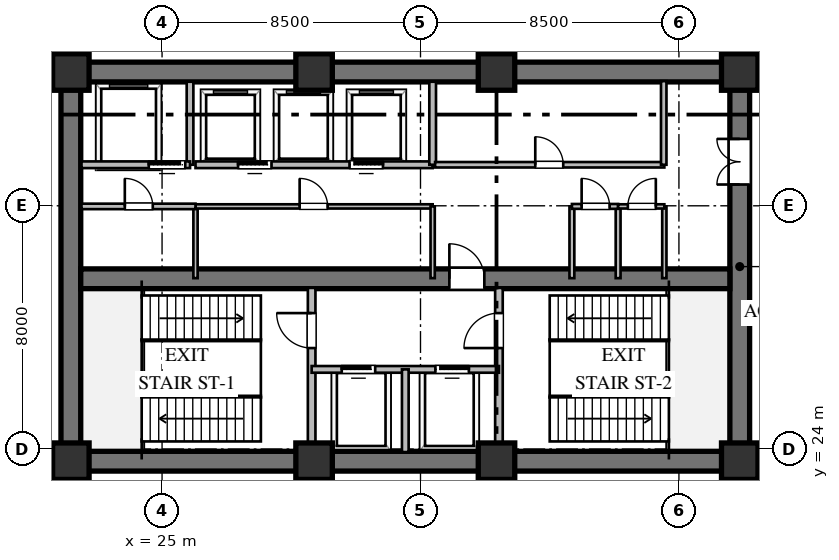
"""IFC4 building model, lengths in metres.
Left out: names, types, materials, properties, quantities, classifications, styles, units other than length and angle.
Written with IfcOpenShell. Run it as: python <this file> out.ifc"""

import sys

from ifc_helpers import new_model, si_unit, direction, frame, frame_2d, origin, origin_2d, place, context, subcontext, project, spatial, rectangle, extrude, element, fill, save


model = new_model("IFC4")
c1 = context("Model", 3, precision=1e-05, world=origin(), true_north=direction((0.0, 1.0)))
c2 = subcontext(c1, "Body", "Model", "MODEL_VIEW")
j1 = project(units=[si_unit("LENGTHUNIT", "METRE"), si_unit("PLANEANGLEUNIT", "RADIAN")], contexts=[c1])
p1 = place(None, origin())
s1 = spatial("IfcSite", under=j1, at=p1, CompositionType="ELEMENT")
p2 = place(p1, origin())
s2 = spatial("IfcBuilding", under=s1, at=p2, CompositionType="ELEMENT")
p3 = place(p2, frame((0.0, 0.0, -5.4)))
s3 = spatial("IfcBuildingStorey", under=s2, at=p3, CompositionType="ELEMENT", Elevation=-5.4)
for number, where, z_axis, x_axis in (
    (1, (21.675, 23.6, 0.0), (0.0, 0.0, 1.0), (1.0, 0.0, 0.0)),
    (2, (21.675, 36.4, 0.0), (0.0, 0.0, 1.0), (1.0, 0.0, 0.0)),
):
    element("IfcWall", number, at=place(p3, frame(where, z_axis=z_axis, x_axis=x_axis)), inside=s3, PredefinedType="SHEAR", context=c2, shape_type="SweptSolid", body=[
        extrude(rectangle(XDim=22.65, YDim=0.65, at=frame_2d((11.325, 0.0))), origin(), (0.0, 0.0, 1.0), 5.12),
    ])
p4 = place(p3, frame((22.0, 23.925, 0.0), z_axis=(0.0, 0.0, 1.0), x_axis=(0.0, 1.0, 0.0)))
e3 = element("IfcWall", 3, at=p4, inside=s3, PredefinedType="SHEAR", context=c2, shape_type="SweptSolid", body=[
    extrude(rectangle(XDim=12.15, YDim=0.65, at=frame_2d((6.075, 0.0))), origin(), (0.0, 0.0, 1.0), 5.12),
])
p5 = place(p3, frame((44.0, 23.925, 0.0), z_axis=(0.0, 0.0, 1.0), x_axis=(0.0, 1.0, 0.0)))
e4 = element("IfcWall", 4, at=p5, inside=s3, PredefinedType="SHEAR", context=c2, shape_type="SweptSolid", body=[
    extrude(rectangle(XDim=12.15, YDim=0.65, at=frame_2d((6.075, 0.0))), origin(), (0.0, 0.0, 1.0), 5.12),
])
p6 = place(p5, frame((8.775, 0.0, 0.0)))
e5 = element("IfcOpeningElement", 5, at=p6, cuts=e4, PredefinedType="OPENING", context=c2, shape_type="SweptSolid", body=[
    extrude(rectangle(XDim=1.5, YDim=2.15, at=frame_2d((0.75, 1.075))), frame((0.0, 0.335, 0.0), z_axis=(0.0, -1.0, 0.0), x_axis=(1.0, 0.0, 0.0)), (0.0, 0.0, 1.0), 0.67),
])
p7 = place(p3, frame((22.325, 29.6, 0.0), z_axis=(0.0, 0.0, 1.0), x_axis=(1.0, 0.0, 0.0)))
e6 = element("IfcWall", 6, at=p7, inside=s3, PredefinedType="SHEAR", context=c2, shape_type="SweptSolid", body=[
    extrude(rectangle(XDim=21.35, YDim=0.65, at=frame_2d((10.675, 0.0))), origin(), (0.0, 0.0, 1.0), 5.12),
])
p8 = place(p7, frame((12.125, 0.0, 0.0)))
e7 = element("IfcOpeningElement", 7, at=p8, cuts=e6, PredefinedType="OPENING", context=c2, shape_type="SweptSolid", body=[
    extrude(rectangle(XDim=1.15, YDim=2.1, at=frame_2d((0.575, 1.05))), frame((0.0, 0.335, 0.0), z_axis=(0.0, -1.0, 0.0), x_axis=(1.0, 0.0, 0.0)), (0.0, 0.0, 1.0), 0.67),
])
for number, where, z_axis, x_axis in (
    (8, (22.0, 23.6, 0.0), (0.0, 0.0, 1.0), (1.0, 0.0, 0.0)),
    (9, (30.0, 23.6, 0.0), (0.0, 0.0, 1.0), (1.0, 0.0, 0.0)),
    (10, (36.0, 23.6, 0.0), (0.0, 0.0, 1.0), (1.0, 0.0, 0.0)),
    (11, (44.0, 23.6, 0.0), (0.0, 0.0, 1.0), (1.0, 0.0, 0.0)),
    (12, (44.0, 36.4, 0.0), (0.0, 0.0, 1.0), (1.0, 0.0, 0.0)),
    (13, (36.0, 36.4, 0.0), (0.0, 0.0, 1.0), (1.0, 0.0, 0.0)),
    (14, (30.0, 36.4, 0.0), (0.0, 0.0, 1.0), (1.0, 0.0, 0.0)),
    (15, (22.0, 36.4, 0.0), (0.0, 0.0, 1.0), (1.0, 0.0, 0.0)),
):
    element("IfcColumn", number, at=place(p3, frame(where, z_axis=z_axis, x_axis=x_axis)), inside=s3, PredefinedType="COLUMN", context=c2, shape_type="SweptSolid", body=[
        extrude(rectangle(XDim=1.2, YDim=1.2, at=origin_2d()), origin(), (0.0, 0.0, 1.0), 5.4),
    ])
p9 = place(p3, frame((29.92, 23.9, 0.0), z_axis=(0.0, 0.0, 1.0), x_axis=(0.0, 1.0, 0.0)))
e16 = element("IfcWall", 16, at=p9, inside=s3, PredefinedType="SOLIDWALL", context=c2, shape_type="SweptSolid", body=[
    extrude(rectangle(XDim=5.4, YDim=0.25, at=frame_2d((2.7, 0.0))), origin(), (0.0, 0.0, 1.0), 5.12),
])
p10 = place(p9, frame((3.421, 0.0, 0.0)))
e17 = element("IfcOpeningElement", 17, at=p10, cuts=e16, PredefinedType="OPENING", context=c2, shape_type="SweptSolid", body=[
    extrude(rectangle(XDim=1.15, YDim=2.1, at=frame_2d((0.575, 1.05))), frame((0.0, 0.135, 0.0), z_axis=(0.0, -1.0, 0.0), x_axis=(1.0, 0.0, 0.0)), (0.0, 0.0, 1.0), 0.27),
])
p11 = place(p3, frame((36.08, 23.9, 0.0), z_axis=(0.0, 0.0, 1.0), x_axis=(0.0, 1.0, 0.0)))
e18 = element("IfcWall", 18, at=p11, inside=s3, PredefinedType="SOLIDWALL", context=c2, shape_type="SweptSolid", body=[
    extrude(rectangle(XDim=5.4, YDim=0.25, at=frame_2d((2.7, 0.0))), origin(), (0.0, 0.0, 1.0), 5.12),
])
p12 = place(p11, frame((3.421, 0.0, 0.0)))
e19 = element("IfcOpeningElement", 19, at=p12, cuts=e18, PredefinedType="OPENING", context=c2, shape_type="SweptSolid", body=[
    extrude(rectangle(XDim=1.15, YDim=2.1, at=frame_2d((0.575, 1.05))), frame((0.0, 0.135, 0.0), z_axis=(0.0, -1.0, 0.0), x_axis=(1.0, 0.0, 0.0)), (0.0, 0.0, 1.0), 0.27),
])
p13 = place(p3, frame((29.92, 26.62, 0.0), z_axis=(0.0, 0.0, 1.0), x_axis=(1.0, 0.0, 0.0)))
e20 = element("IfcWall", 20, at=p13, inside=s3, PredefinedType="SOLIDWALL", context=c2, shape_type="SweptSolid", body=[
    extrude(rectangle(XDim=6.16, YDim=0.22, at=frame_2d((3.08, 0.0))), origin(), (0.0, 0.0, 1.0), 5.12),
])
p14 = place(p13, frame((0.99, 0.0, 0.0)))
e21 = element("IfcOpeningElement", 21, at=p14, cuts=e20, PredefinedType="OPENING", context=c2, shape_type="SweptSolid", body=[
    extrude(rectangle(XDim=1.1, YDim=2.1, at=frame_2d((0.55, 1.05))), frame((0.0, 0.12, 0.0), z_axis=(0.0, -1.0, 0.0), x_axis=(1.0, 0.0, 0.0)), (0.0, 0.0, 1.0), 0.24),
])
p15 = place(p13, frame((4.07, 0.0, 0.0)))
e22 = element("IfcOpeningElement", 22, at=p15, cuts=e20, PredefinedType="OPENING", context=c2, shape_type="SweptSolid", body=[
    extrude(rectangle(XDim=1.1, YDim=2.1, at=frame_2d((0.55, 1.05))), frame((0.0, 0.12, 0.0), z_axis=(0.0, -1.0, 0.0), x_axis=(1.0, 0.0, 0.0)), (0.0, 0.0, 1.0), 0.24),
])
p16 = place(p3, frame((33.0, 23.9, 0.0), z_axis=(0.0, 0.0, 1.0), x_axis=(0.0, 1.0, 0.0)))
e23 = element("IfcWall", 23, at=p16, inside=s3, PredefinedType="SOLIDWALL", context=c2, shape_type="SweptSolid", body=[
    extrude(rectangle(XDim=2.72, YDim=0.22, at=frame_2d((1.36, 0.0))), origin(), (0.0, 0.0, 1.0), 5.12),
])
p17 = place(p3, frame((25.92, 33.35, 0.0), z_axis=(0.0, 0.0, 1.0), x_axis=(0.0, 1.0, 0.0)))
e24 = element("IfcWall", 24, at=p17, inside=s3, PredefinedType="SOLIDWALL", context=c2, shape_type="SweptSolid", body=[
    extrude(rectangle(XDim=2.73, YDim=0.22, at=frame_2d((1.365, 0.0))), origin(), (0.0, 0.0, 1.0), 5.12),
])
p18 = place(p3, frame((22.35, 33.35, 0.0), z_axis=(0.0, 0.0, 1.0), x_axis=(1.0, 0.0, 0.0)))
e25 = element("IfcWall", 25, at=p18, inside=s3, PredefinedType="SOLIDWALL", context=c2, shape_type="SweptSolid", body=[
    extrude(rectangle(XDim=3.57, YDim=0.22, at=frame_2d((1.785, 0.0))), origin(), (0.0, 0.0, 1.0), 5.12),
])
p19 = place(p18, frame((2.213, 0.0, 0.0)))
e26 = element("IfcOpeningElement", 26, at=p19, cuts=e25, PredefinedType="OPENING", context=c2, shape_type="SweptSolid", body=[
    extrude(rectangle(XDim=1.2, YDim=2.1, at=frame_2d((0.6, 1.05))), frame((0.0, 0.12, 0.0), z_axis=(0.0, -1.0, 0.0), x_axis=(1.0, 0.0, 0.0)), (0.0, 0.0, 1.0), 0.24),
])
p20 = place(p3, frame((26.1, 29.62, 0.0), z_axis=(0.0, 0.0, 1.0), x_axis=(0.0, 1.0, 0.0)))
e27 = element("IfcWall", 27, at=p20, inside=s3, PredefinedType="PARTITIONING", context=c2, shape_type="SweptSolid", body=[
    extrude(rectangle(XDim=2.36, YDim=0.14, at=frame_2d((1.18, 0.0))), origin(), (0.0, 0.0, 1.0), 5.12),
])
p21 = place(p3, frame((26.1, 31.98, 0.0), z_axis=(0.0, 0.0, 1.0), x_axis=(1.0, 0.0, 0.0)))
e28 = element("IfcWall", 28, at=p21, inside=s3, PredefinedType="PARTITIONING", context=c2, shape_type="SweptSolid", body=[
    extrude(rectangle(XDim=7.8, YDim=0.14, at=frame_2d((3.9, 0.0))), origin(), (0.0, 0.0, 1.0), 5.12),
])
p22 = place(p21, frame((3.425, 0.0, 0.0)))
e29 = element("IfcOpeningElement", 29, at=p22, cuts=e28, PredefinedType="OPENING", context=c2, shape_type="SweptSolid", body=[
    extrude(rectangle(XDim=0.92, YDim=2.1, at=frame_2d((0.46, 1.05))), frame((0.0, 0.08, 0.0), z_axis=(0.0, -1.0, 0.0), x_axis=(1.0, 0.0, 0.0)), (0.0, 0.0, 1.0), 0.16),
])
p23 = place(p3, frame((33.9, 29.62, 0.0), z_axis=(0.0, 0.0, 1.0), x_axis=(0.0, 1.0, 0.0)))
e30 = element("IfcWall", 30, at=p23, inside=s3, PredefinedType="PARTITIONING", context=c2, shape_type="SweptSolid", body=[
    extrude(rectangle(XDim=2.36, YDim=0.14, at=frame_2d((1.18, 0.0))), origin(), (0.0, 0.0, 1.0), 5.12),
])
p24 = place(p3, frame((26.1, 33.35, 0.0), z_axis=(0.0, 0.0, 1.0), x_axis=(1.0, 0.0, 0.0)))
e31 = element("IfcWall", 31, at=p24, inside=s3, PredefinedType="SOLIDWALL", context=c2, shape_type="SweptSolid", body=[
    extrude(rectangle(XDim=7.8, YDim=0.22, at=frame_2d((3.9, 0.0))), origin(), (0.0, 0.0, 1.0), 5.12),
])
p25 = place(p24, frame((1.4, 0.0, 0.0)))
e32 = element("IfcOpeningElement", 32, at=p25, cuts=e31, PredefinedType="OPENING", context=c2, shape_type="SweptSolid", body=[
    extrude(rectangle(XDim=1.1, YDim=2.1, at=frame_2d((0.55, 1.05))), frame((0.0, 0.12, 0.0), z_axis=(0.0, -1.0, 0.0), x_axis=(1.0, 0.0, 0.0)), (0.0, 0.0, 1.0), 0.24),
])
p26 = place(p24, frame((5.066, 0.0, 0.0)))
e33 = element("IfcOpeningElement", 33, at=p26, cuts=e31, PredefinedType="OPENING", context=c2, shape_type="SweptSolid", body=[
    extrude(rectangle(XDim=1.1, YDim=2.1, at=frame_2d((0.55, 1.05))), frame((0.0, 0.12, 0.0), z_axis=(0.0, -1.0, 0.0), x_axis=(1.0, 0.0, 0.0)), (0.0, 0.0, 1.0), 0.24),
])
p27 = place(p3, frame((33.9, 33.35, 0.0), z_axis=(0.0, 0.0, 1.0), x_axis=(0.0, 1.0, 0.0)))
e34 = element("IfcWall", 34, at=p27, inside=s3, PredefinedType="SOLIDWALL", context=c2, shape_type="SweptSolid", body=[
    extrude(rectangle(XDim=2.73, YDim=0.22, at=frame_2d((1.365, 0.0))), origin(), (0.0, 0.0, 1.0), 5.12),
])
p28 = place(p3, frame((33.98, 33.35, 0.0), z_axis=(0.0, 0.0, 1.0), x_axis=(1.0, 0.0, 0.0)))
e35 = element("IfcWall", 35, at=p28, inside=s3, PredefinedType="PARTITIONING", context=c2, shape_type="SweptSolid", body=[
    extrude(rectangle(XDim=7.54, YDim=0.18, at=frame_2d((3.77, 0.0))), origin(), (0.0, 0.0, 1.0), 5.12),
])
p29 = place(p28, frame((3.295, 0.0, 0.0)))
e36 = element("IfcOpeningElement", 36, at=p29, cuts=e35, PredefinedType="OPENING", context=c2, shape_type="SweptSolid", body=[
    extrude(rectangle(XDim=0.92, YDim=2.1, at=frame_2d((0.46, 1.05))), frame((0.0, 0.1, 0.0), z_axis=(0.0, -1.0, 0.0), x_axis=(1.0, 0.0, 0.0)), (0.0, 0.0, 1.0), 0.2),
])
p30 = place(p3, frame((41.5, 33.35, 0.0), z_axis=(0.0, 0.0, 1.0), x_axis=(0.0, 1.0, 0.0)))
e37 = element("IfcWall", 37, at=p30, inside=s3, PredefinedType="PARTITIONING", context=c2, shape_type="SweptSolid", body=[
    extrude(rectangle(XDim=2.75, YDim=0.18, at=frame_2d((1.375, 0.0))), origin(), (0.0, 0.0, 1.0), 5.12),
])
p31 = place(p3, frame((22.35, 31.98, 0.0), z_axis=(0.0, 0.0, 1.0), x_axis=(1.0, 0.0, 0.0)))
e38 = element("IfcWall", 38, at=p31, inside=s3, PredefinedType="PARTITIONING", context=c2, shape_type="SweptSolid", body=[
    extrude(rectangle(XDim=3.75, YDim=0.18, at=frame_2d((1.875, 0.0))), origin(), (0.0, 0.0, 1.0), 5.12),
])
p32 = place(p31, frame((1.425, 0.0, 0.0)))
e39 = element("IfcOpeningElement", 39, at=p32, cuts=e38, PredefinedType="OPENING", context=c2, shape_type="SweptSolid", body=[
    extrude(rectangle(XDim=0.92, YDim=2.1, at=frame_2d((0.46, 1.05))), frame((0.0, 0.1, 0.0), z_axis=(0.0, -1.0, 0.0), x_axis=(1.0, 0.0, 0.0)), (0.0, 0.0, 1.0), 0.2),
])
for number, where, z_axis, x_axis in (
    (40, (38.48, 29.62, 0.0), (0.0, 0.0, 1.0), (0.0, 1.0, 0.0)),
    (41, (40.0, 29.62, 0.0), (0.0, 0.0, 1.0), (0.0, 1.0, 0.0)),
):
    element("IfcWall", number, at=place(p3, frame(where, z_axis=z_axis, x_axis=x_axis)), inside=s3, PredefinedType="PLUMBINGWALL", context=c2, shape_type="SweptSolid", body=[
        extrude(rectangle(XDim=2.36, YDim=0.16, at=frame_2d((1.18, 0.0))), origin(), (0.0, 0.0, 1.0), 5.12),
    ])
p33 = place(p3, frame((41.52, 29.62, 0.0), z_axis=(0.0, 0.0, 1.0), x_axis=(0.0, 1.0, 0.0)))
e42 = element("IfcWall", 42, at=p33, inside=s3, PredefinedType="PARTITIONING", context=c2, shape_type="SweptSolid", body=[
    extrude(rectangle(XDim=2.36, YDim=0.14, at=frame_2d((1.18, 0.0))), origin(), (0.0, 0.0, 1.0), 2.187),
])
p34 = place(p3, frame((38.48, 31.98, 0.0), z_axis=(0.0, 0.0, 1.0), x_axis=(1.0, 0.0, 0.0)))
e43 = element("IfcWall", 43, at=p34, inside=s3, PredefinedType="PLUMBINGWALL", context=c2, shape_type="SweptSolid", body=[
    extrude(rectangle(XDim=1.52, YDim=0.16, at=frame_2d((0.76, 0.0))), origin(), (0.0, 0.0, 1.0), 5.12),
])
p35 = place(p34, frame((0.32, 0.0, 0.0)))
e44 = element("IfcOpeningElement", 44, at=p35, cuts=e43, PredefinedType="OPENING", context=c2, shape_type="SweptSolid", body=[
    extrude(rectangle(XDim=0.92, YDim=2.1, at=frame_2d((0.46, 1.05))), frame((0.0, 0.09, 0.0), z_axis=(0.0, -1.0, 0.0), x_axis=(1.0, 0.0, 0.0)), (0.0, 0.0, 1.0), 0.18),
])
p36 = place(p3, frame((40.0, 31.98, 0.0), z_axis=(0.0, 0.0, 1.0), x_axis=(1.0, 0.0, 0.0)))
e45 = element("IfcWall", 45, at=p36, inside=s3, PredefinedType="PARTITIONING", context=c2, shape_type="SweptSolid", body=[
    extrude(rectangle(XDim=1.52, YDim=0.14, at=frame_2d((0.76, 0.0))), origin(), (0.0, 0.0, 1.0), 5.12),
])
p37 = place(p36, frame((0.32, 0.0, 0.0)))
e46 = element("IfcOpeningElement", 46, at=p37, cuts=e45, PredefinedType="OPENING", context=c2, shape_type="SweptSolid", body=[
    extrude(rectangle(XDim=0.92, YDim=2.1, at=frame_2d((0.46, 1.05))), frame((0.0, 0.08, 0.0), z_axis=(0.0, -1.0, 0.0), x_axis=(1.0, 0.0, 0.0)), (0.0, 0.0, 1.0), 0.16),
])
p38 = place(p3, frame((46.755, 36.725, 0.0), z_axis=(0.0, 0.0, 1.0), x_axis=(-1.0, 0.0, 0.0)))
e47 = element("IfcWall", 47, at=p38, inside=s3, PredefinedType="PARTITIONING", context=c2, shape_type="SweptSolid", body=[
    extrude(rectangle(XDim=2.495, YDim=0.18, at=frame_2d((1.248, 0.0))), origin(), (0.0, 0.0, 1.0), 4.26),
])
p39 = place(p10, origin())
e48 = element("IfcDoor", 48, at=p39, inside=s3, OperationType="SINGLE_SWING_RIGHT", PredefinedType="DOOR", context=c2, shape_type="SweptSolid", body=[
    extrude(rectangle(XDim=1.15, YDim=2.1, at=frame_2d((0.575, 1.05))), frame((0.0, 0.025, 0.0), z_axis=(0.0, -1.0, 0.0), x_axis=(1.0, 0.0, 0.0)), (0.0, 0.0, 1.0), 0.05),
])
fill(e17, e48)
p40 = place(p12, origin())
e49 = element("IfcDoor", 49, at=p40, inside=s3, OperationType="SINGLE_SWING_LEFT", PredefinedType="DOOR", context=c2, shape_type="SweptSolid", body=[
    extrude(rectangle(XDim=1.15, YDim=2.1, at=frame_2d((0.575, 1.05))), frame((0.0, 0.025, 0.0), z_axis=(0.0, -1.0, 0.0), x_axis=(1.0, 0.0, 0.0)), (0.0, 0.0, 1.0), 0.05),
])
fill(e19, e49)
p41 = place(p14, origin())
e50 = element("IfcDoor", 50, at=p41, inside=s3, OperationType="SLIDING_TO_LEFT", PredefinedType="DOOR", context=c2, shape_type="SweptSolid", body=[
    extrude(rectangle(XDim=1.1, YDim=2.1, at=frame_2d((0.55, 1.05))), frame((0.0, 0.025, 0.0), z_axis=(0.0, -1.0, 0.0), x_axis=(1.0, 0.0, 0.0)), (0.0, 0.0, 1.0), 0.05),
])
fill(e21, e50)
p42 = place(p15, origin())
e51 = element("IfcDoor", 51, at=p42, inside=s3, OperationType="SLIDING_TO_RIGHT", PredefinedType="DOOR", context=c2, shape_type="SweptSolid", body=[
    extrude(rectangle(XDim=1.1, YDim=2.1, at=frame_2d((0.55, 1.05))), frame((0.0, 0.025, 0.0), z_axis=(0.0, -1.0, 0.0), x_axis=(1.0, 0.0, 0.0)), (0.0, 0.0, 1.0), 0.05),
])
fill(e22, e51)
p43 = place(p8, origin())
e52 = element("IfcDoor", 52, at=p43, inside=s3, OperationType="SINGLE_SWING_LEFT", PredefinedType="DOOR", context=c2, shape_type="SweptSolid", body=[
    extrude(rectangle(XDim=1.15, YDim=2.1, at=frame_2d((0.575, 1.05))), frame((0.0, 0.025, 0.0), z_axis=(0.0, -1.0, 0.0), x_axis=(1.0, 0.0, 0.0)), (0.0, 0.0, 1.0), 0.05),
])
fill(e7, e52)
p44 = place(p6, origin())
e53 = element("IfcDoor", 53, at=p44, inside=s3, OperationType="DOUBLE_DOOR_SINGLE_SWING", PredefinedType="DOOR", context=c2, shape_type="SweptSolid", body=[
    extrude(rectangle(XDim=1.5, YDim=2.15, at=frame_2d((0.75, 1.075))), frame((0.0, 0.025, 0.0), z_axis=(0.0, -1.0, 0.0), x_axis=(1.0, 0.0, 0.0)), (0.0, 0.0, 1.0), 0.05),
])
fill(e5, e53)
p45 = place(p19, origin())
e54 = element("IfcDoor", 54, at=p45, inside=s3, OperationType="SLIDING_TO_LEFT", PredefinedType="DOOR", context=c2, shape_type="SweptSolid", body=[
    extrude(rectangle(XDim=1.2, YDim=2.1, at=frame_2d((0.6, 1.05))), frame((0.0, 0.025, 0.0), z_axis=(0.0, -1.0, 0.0), x_axis=(1.0, 0.0, 0.0)), (0.0, 0.0, 1.0), 0.05),
])
fill(e26, e54)
p46 = place(p22, origin())
e55 = element("IfcDoor", 55, at=p46, inside=s3, OperationType="SINGLE_SWING_LEFT", PredefinedType="DOOR", context=c2, shape_type="SweptSolid", body=[
    extrude(rectangle(XDim=0.92, YDim=2.1, at=frame_2d((0.46, 1.05))), frame((0.0, 0.025, 0.0), z_axis=(0.0, -1.0, 0.0), x_axis=(1.0, 0.0, 0.0)), (0.0, 0.0, 1.0), 0.05),
])
fill(e29, e55)
p47 = place(p25, origin())
e56 = element("IfcDoor", 56, at=p47, inside=s3, OperationType="SLIDING_TO_LEFT", PredefinedType="DOOR", context=c2, shape_type="SweptSolid", body=[
    extrude(rectangle(XDim=1.1, YDim=2.1, at=frame_2d((0.55, 1.05))), frame((0.0, 0.025, 0.0), z_axis=(0.0, -1.0, 0.0), x_axis=(1.0, 0.0, 0.0)), (0.0, 0.0, 1.0), 0.05),
])
fill(e32, e56)
p48 = place(p26, origin())
e57 = element("IfcDoor", 57, at=p48, inside=s3, OperationType="SLIDING_TO_RIGHT", PredefinedType="DOOR", context=c2, shape_type="SweptSolid", body=[
    extrude(rectangle(XDim=1.1, YDim=2.1, at=frame_2d((0.55, 1.05))), frame((0.0, 0.025, 0.0), z_axis=(0.0, -1.0, 0.0), x_axis=(1.0, 0.0, 0.0)), (0.0, 0.0, 1.0), 0.05),
])
fill(e33, e57)
p49 = place(p29, origin())
e58 = element("IfcDoor", 58, at=p49, inside=s3, OperationType="SINGLE_SWING_LEFT", PredefinedType="DOOR", context=c2, shape_type="SweptSolid", body=[
    extrude(rectangle(XDim=0.92, YDim=2.1, at=frame_2d((0.46, 1.05))), frame((0.0, 0.025, 0.0), z_axis=(0.0, -1.0, 0.0), x_axis=(1.0, 0.0, 0.0)), (0.0, 0.0, 1.0), 0.05),
])
fill(e36, e58)
p50 = place(p32, origin())
e59 = element("IfcDoor", 59, at=p50, inside=s3, OperationType="SINGLE_SWING_LEFT", PredefinedType="DOOR", context=c2, shape_type="SweptSolid", body=[
    extrude(rectangle(XDim=0.92, YDim=2.1, at=frame_2d((0.46, 1.05))), frame((0.0, 0.025, 0.0), z_axis=(0.0, -1.0, 0.0), x_axis=(1.0, 0.0, 0.0)), (0.0, 0.0, 1.0), 0.05),
])
fill(e39, e59)
p51 = place(p35, origin())
e60 = element("IfcDoor", 60, at=p51, inside=s3, OperationType="SINGLE_SWING_LEFT", PredefinedType="DOOR", context=c2, shape_type="SweptSolid", body=[
    extrude(rectangle(XDim=0.92, YDim=2.1, at=frame_2d((0.46, 1.05))), frame((0.0, 0.025, 0.0), z_axis=(0.0, -1.0, 0.0), x_axis=(1.0, 0.0, 0.0)), (0.0, 0.0, 1.0), 0.05),
])
fill(e44, e60)
p52 = place(p37, origin())
e61 = element("IfcDoor", 61, at=p52, inside=s3, OperationType="SINGLE_SWING_RIGHT", PredefinedType="DOOR", context=c2, shape_type="SweptSolid", body=[
    extrude(rectangle(XDim=0.92, YDim=2.1, at=frame_2d((0.46, 1.05))), frame((0.0, 0.025, 0.0), z_axis=(0.0, -1.0, 0.0), x_axis=(1.0, 0.0, 0.0)), (0.0, 0.0, 1.0), 0.05),
])
fill(e46, e61)
save(model, sys.argv[1])
